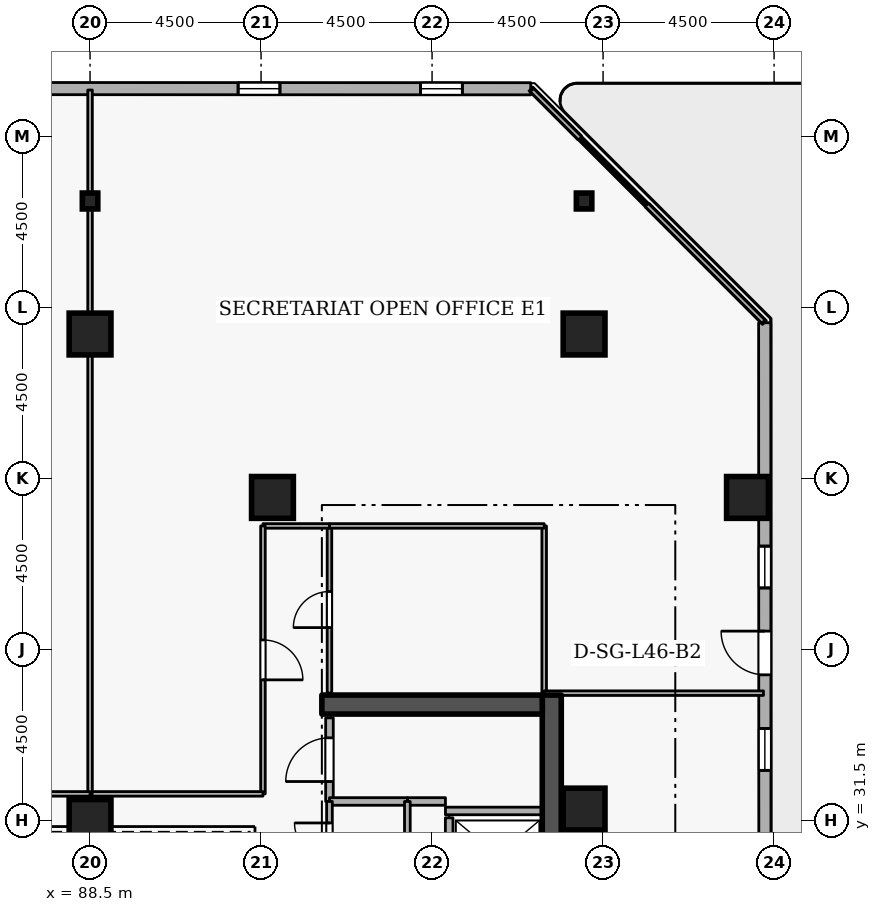
"""IFC4 building model, lengths in metres.
Left out: names, types, materials, properties, quantities, classifications, styles, units other than length and angle.
Written with IfcOpenShell. Run it as: python <this file> out.ifc"""

import sys

from ifc_helpers import new_model, si_unit, direction, frame, frame_2d, origin, origin_2d, place, context, subcontext, project, spatial, rectangle, i_section, extrude, element, fill, save


model = new_model("IFC4")
c1 = context("Model", 3, precision=1e-05, world=origin(), true_north=direction((0.0, 1.0)))
c2 = subcontext(c1, "Body", "Model", "MODEL_VIEW")
j1 = project(units=[si_unit("LENGTHUNIT", "METRE"), si_unit("PLANEANGLEUNIT", "RADIAN")], contexts=[c1])
p1 = place(None, origin())
s1 = spatial("IfcSite", under=j1, at=p1, CompositionType="ELEMENT")
p2 = place(p1, origin())
s2 = spatial("IfcBuilding", under=s1, at=p2, CompositionType="ELEMENT")
p3 = place(p2, frame((0.0, 0.0, 174.3)))
s3 = spatial("IfcBuildingStorey", under=s2, at=p3, CompositionType="ELEMENT", Elevation=174.3)
p4 = place(p3, frame((100.65, 19.2, 0.0), z_axis=(0.0, 0.0, 1.0), x_axis=(0.0, 1.0, 0.0)))
e1 = element("IfcWall", 1, at=p4, inside=s3, PredefinedType="SHEAR", context=c2, shape_type="SweptSolid", body=[
    extrude(rectangle(XDim=15.6, YDim=0.5, at=frame_2d((7.8, 0.0))), origin(), (0.0, 0.0, 1.0), 4.2),
])
p5 = place(p3, frame((94.6, 34.55, 0.0), z_axis=(0.0, 0.0, 1.0), x_axis=(1.0, 0.0, 0.0)))
e2 = element("IfcWall", 2, at=p5, inside=s3, PredefinedType="SHEAR", context=c2, shape_type="SweptSolid", body=[
    extrude(rectangle(XDim=5.8, YDim=0.5, at=frame_2d((2.9, 0.0))), origin(), (0.0, 0.0, 1.0), 4.2),
])
for number, where, z_axis, x_axis in (
    (3, (105.8, 40.0, 0.0), (0.0, 0.0, 1.0), (1.0, 0.0, 0.0)),
    (4, (101.5, 44.3, 0.0), (0.0, 0.0, 1.0), (1.0, 0.0, 0.0)),
    (5, (88.5, 44.3, 0.0), (0.0, 0.0, 1.0), (1.0, 0.0, 0.0)),
    (6, (93.3, 40.0, 0.0), (0.0, 0.0, 1.0), (1.0, 0.0, 0.0)),
    (7, (101.5, 31.8, 0.0), (0.0, 0.0, 1.0), (1.0, 0.0, 0.0)),
    (8, (88.5, 31.5, 0.0), (0.0, 0.0, 1.0), (1.0, 0.0, 0.0)),
):
    element("IfcColumn", number, at=place(p3, frame(where, z_axis=z_axis, x_axis=x_axis)), inside=s3, PredefinedType="COLUMN", context=c2, shape_type="SweptSolid", body=[
        extrude(rectangle(XDim=1.1, YDim=1.1, at=origin_2d()), origin(), (0.0, 0.0, 1.0), 4.2),
    ])
for number, where, z_axis, x_axis in (
    (9, (101.5, 47.8, 0.0), (0.0, 0.0, 1.0), (1.0, 0.0, 0.0)),
    (10, (88.5, 47.8, 0.0), (0.0, 0.0, 1.0), (1.0, 0.0, 0.0)),
):
    element("IfcColumn", number, at=place(p3, frame(where, z_axis=z_axis, x_axis=x_axis)), inside=s3, PredefinedType="COLUMN", context=c2, shape_type="SweptSolid", body=[
        extrude(i_section(OverallWidth=0.407, OverallDepth=0.419, WebThickness=0.031, FlangeThickness=0.049, FilletRadius=0.015, at=origin_2d()), origin(), (0.0, 0.0, 1.0), 4.2),
    ])
p6 = place(p3, frame((106.265, 11.819, 0.0), z_axis=(0.0, 0.0, 1.0), x_axis=(-0.000364968916, 0.999999933399, 0.0)))
e11 = element("IfcWall", 11, at=p6, inside=s3, PredefinedType="STANDARD", context=c2, shape_type="SweptSolid", body=[
    extrude(rectangle(XDim=32.778, YDim=0.32, at=frame_2d((16.389, 0.0))), origin(), (0.0, 0.0, 1.0), 3.3),
])
p7 = place(p6, frame((23.514, 0.0, 0.0)))
e12 = element("IfcOpeningElement", 12, at=p7, cuts=e11, PredefinedType="OPENING", context=c2, shape_type="SweptSolid", body=[
    extrude(rectangle(XDim=1.15, YDim=2.1, at=frame_2d((0.575, 1.05))), frame((0.0, 0.17, 0.0), z_axis=(0.0, -1.0, 0.0), x_axis=(1.0, 0.0, 0.0)), (0.0, 0.0, 1.0), 0.34),
])
p8 = place(p6, frame((6.6, 0.0, 0.72)))
e13 = element("IfcOpeningElement", 13, at=p8, cuts=e11, PredefinedType="OPENING", context=c2, shape_type="SweptSolid", body=[
    extrude(rectangle(XDim=1.1, YDim=1.8, at=frame_2d((0.55, 0.9))), frame((0.0, 0.17, 0.0), z_axis=(0.0, -1.0, 0.0), x_axis=(1.0, 0.0, 0.0)), (0.0, 0.0, 1.0), 0.34),
])
p9 = place(p6, frame((11.4, 0.0, 0.72)))
e14 = element("IfcOpeningElement", 14, at=p9, cuts=e11, PredefinedType="OPENING", context=c2, shape_type="SweptSolid", body=[
    extrude(rectangle(XDim=1.1, YDim=1.8, at=frame_2d((0.55, 0.9))), frame((0.0, 0.17, 0.0), z_axis=(0.0, -1.0, 0.0), x_axis=(1.0, 0.0, 0.0)), (0.0, 0.0, 1.0), 0.34),
])
p10 = place(p6, frame((21.0, 0.0, 0.72)))
e15 = element("IfcOpeningElement", 15, at=p10, cuts=e11, PredefinedType="OPENING", context=c2, shape_type="SweptSolid", body=[
    extrude(rectangle(XDim=1.1, YDim=1.8, at=frame_2d((0.55, 0.9))), frame((0.0, 0.17, 0.0), z_axis=(0.0, -1.0, 0.0), x_axis=(1.0, 0.0, 0.0)), (0.0, 0.0, 1.0), 0.34),
])
p11 = place(p6, frame((25.8, 0.0, 0.72)))
e16 = element("IfcOpeningElement", 16, at=p11, cuts=e11, PredefinedType="OPENING", context=c2, shape_type="SweptSolid", body=[
    extrude(rectangle(XDim=1.1, YDim=1.8, at=frame_2d((0.55, 0.9))), frame((0.0, 0.17, 0.0), z_axis=(0.0, -1.0, 0.0), x_axis=(1.0, 0.0, 0.0)), (0.0, 0.0, 1.0), 0.34),
])
p12 = place(p3, frame((100.096, 50.753, 0.0), z_axis=(0.0, 0.0, 1.0), x_axis=(-0.999999933399, 0.000364968916, 0.0)))
e17 = element("IfcWall", 17, at=p12, inside=s3, PredefinedType="STANDARD", context=c2, shape_type="SweptSolid", body=[
    extrude(rectangle(XDim=32.778, YDim=0.32, at=frame_2d((16.389, 0.0))), origin(), (0.0, 0.0, 1.0), 3.3),
])
p13 = place(p12, frame((1.8, 0.0, 0.72)))
e18 = element("IfcOpeningElement", 18, at=p13, cuts=e17, PredefinedType="OPENING", context=c2, shape_type="SweptSolid", body=[
    extrude(rectangle(XDim=1.1, YDim=1.8, at=frame_2d((0.55, 0.9))), frame((0.0, 0.17, 0.0), z_axis=(0.0, -1.0, 0.0), x_axis=(1.0, 0.0, 0.0)), (0.0, 0.0, 1.0), 0.34),
])
p14 = place(p12, frame((6.6, 0.0, 0.72)))
e19 = element("IfcOpeningElement", 19, at=p14, cuts=e17, PredefinedType="OPENING", context=c2, shape_type="SweptSolid", body=[
    extrude(rectangle(XDim=1.1, YDim=1.8, at=frame_2d((0.55, 0.9))), frame((0.0, 0.17, 0.0), z_axis=(0.0, -1.0, 0.0), x_axis=(1.0, 0.0, 0.0)), (0.0, 0.0, 1.0), 0.34),
])
p15 = place(p12, frame((16.2, 0.0, 0.72)))
e20 = element("IfcOpeningElement", 20, at=p15, cuts=e17, PredefinedType="OPENING", context=c2, shape_type="SweptSolid", body=[
    extrude(rectangle(XDim=1.1, YDim=1.8, at=frame_2d((0.55, 0.9))), frame((0.0, 0.17, 0.0), z_axis=(0.0, -1.0, 0.0), x_axis=(1.0, 0.0, 0.0)), (0.0, 0.0, 1.0), 0.34),
])
p16 = place(p12, frame((21.0, 0.0, 0.72)))
e21 = element("IfcOpeningElement", 21, at=p16, cuts=e17, PredefinedType="OPENING", context=c2, shape_type="SweptSolid", body=[
    extrude(rectangle(XDim=1.1, YDim=1.8, at=frame_2d((0.55, 0.9))), frame((0.0, 0.17, 0.0), z_axis=(0.0, -1.0, 0.0), x_axis=(1.0, 0.0, 0.0)), (0.0, 0.0, 1.0), 0.34),
])
p17 = place(p12, frame((25.8, 0.0, 0.72)))
e22 = element("IfcOpeningElement", 22, at=p17, cuts=e17, PredefinedType="OPENING", context=c2, shape_type="SweptSolid", body=[
    extrude(rectangle(XDim=1.1, YDim=1.8, at=frame_2d((0.55, 0.9))), frame((0.0, 0.17, 0.0), z_axis=(0.0, -1.0, 0.0), x_axis=(1.0, 0.0, 0.0)), (0.0, 0.0, 1.0), 0.34),
])
p18 = place(p3, frame((97.95, 31.57, 0.0), z_axis=(0.0, 0.0, 1.0), x_axis=(0.0, -1.0, 0.0)))
e23 = element("IfcWall", 23, at=p18, inside=s3, PredefinedType="STANDARD", context=c2, shape_type="SweptSolid", body=[
    extrude(rectangle(XDim=1.99, YDim=0.2, at=frame_2d((0.995, 0.0))), origin(), (0.0, 0.0, 1.0), 3.94),
])
p19 = place(p18, frame((0.485, 0.0, 0.0)))
e24 = element("IfcOpeningElement", 24, at=p19, cuts=e23, PredefinedType="OPENING", context=c2, shape_type="SweptSolid", body=[
    extrude(rectangle(XDim=1.02, YDim=2.06, at=frame_2d((0.51, 1.03))), frame((0.0, 0.11, 0.0), z_axis=(0.0, -1.0, 0.0), x_axis=(1.0, 0.0, 0.0)), (0.0, 0.0, 1.0), 0.22),
])
p20 = place(p3, frame((97.852, 31.75, 0.0), z_axis=(0.0, 0.0, 1.0), x_axis=(1.0, 0.0, 0.0)))
e25 = element("IfcWall", 25, at=p20, inside=s3, PredefinedType="STANDARD", context=c2, shape_type="SweptSolid", body=[
    extrude(rectangle(XDim=2.536, YDim=0.2, at=frame_2d((1.268, 0.0))), origin(), (0.0, 0.0, 1.0), 3.94),
])
p21 = place(p3, frame((94.8, 32.0, 0.0), z_axis=(0.0, 0.0, 1.0), x_axis=(0.0, 1.0, 0.0)))
e26 = element("IfcWall", 26, at=p21, inside=s3, PredefinedType="STANDARD", context=c2, shape_type="SweptSolid", body=[
    extrude(rectangle(XDim=2.2, YDim=0.2, at=frame_2d((1.1, 0.0))), origin(), (0.0, 0.0, 1.0), 3.94),
])
p22 = place(p21, frame((0.525, 0.0, 0.0)))
e27 = element("IfcOpeningElement", 27, at=p22, cuts=e26, PredefinedType="OPENING", context=c2, shape_type="SweptSolid", body=[
    extrude(rectangle(XDim=1.15, YDim=2.1, at=frame_2d((0.575, 1.05))), frame((0.0, 0.11, 0.0), z_axis=(0.0, -1.0, 0.0), x_axis=(1.0, 0.0, 0.0)), (0.0, 0.0, 1.0), 0.22),
])
p23 = place(p3, frame((97.852, 32.0, 0.0), z_axis=(0.0, 0.0, 1.0), x_axis=(-1.0, 0.0, 0.0)))
e28 = element("IfcWall", 28, at=p23, inside=s3, PredefinedType="STANDARD", context=c2, shape_type="SweptSolid", body=[
    extrude(rectangle(XDim=1.002, YDim=0.2, at=frame_2d((0.501, 0.0))), origin(), (0.0, 0.0, 1.0), 3.94),
])
p24 = place(p3, frame((96.85, 32.0, 0.0), z_axis=(0.0, 0.0, 1.0), x_axis=(-1.0, 0.0, 0.0)))
e29 = element("IfcWall", 29, at=p24, inside=s3, PredefinedType="STANDARD", context=c2, shape_type="SweptSolid", body=[
    extrude(rectangle(XDim=2.05, YDim=0.2, at=frame_2d((1.025, 0.0))), origin(), (0.0, 0.0, 1.0), 3.94),
])
p25 = place(p3, frame((94.8, 29.95, 0.0), z_axis=(0.0, 0.0, 1.0), x_axis=(0.0, 1.0, 0.0)))
e30 = element("IfcWall", 30, at=p25, inside=s3, PredefinedType="PARTITIONING", context=c2, shape_type="SweptSolid", body=[
    extrude(rectangle(XDim=2.05, YDim=0.15, at=frame_2d((1.025, 0.0))), origin(), (0.0, 0.0, 1.0), 3.94),
])
p26 = place(p25, frame((0.565, 0.0, 0.0)))
e31 = element("IfcOpeningElement", 31, at=p26, cuts=e30, PredefinedType="OPENING", context=c2, shape_type="SweptSolid", body=[
    extrude(rectangle(XDim=0.92, YDim=2.08, at=frame_2d((0.46, 1.04))), frame((0.0, 0.085, 0.0), z_axis=(0.0, -1.0, 0.0), x_axis=(1.0, 0.0, 0.0)), (0.0, 0.0, 1.0), 0.17),
])
p27 = place(p3, frame((96.85, 32.0, 0.0), z_axis=(0.0, 0.0, 1.0), x_axis=(0.0, -1.0, 0.0)))
e32 = element("IfcWall", 32, at=p27, inside=s3, PredefinedType="PARTITIONING", context=c2, shape_type="SweptSolid", body=[
    extrude(rectangle(XDim=2.05, YDim=0.15, at=frame_2d((1.025, 0.0))), origin(), (0.0, 0.0, 1.0), 3.94),
])
p28 = place(p3, frame((100.45, 39.25, 0.0), z_axis=(0.0, 0.0, 1.0), x_axis=(0.0, -1.0, 0.0)))
e33 = element("IfcWall", 33, at=p28, inside=s3, PredefinedType="PARTITIONING", context=c2, shape_type="SweptSolid", body=[
    extrude(rectangle(XDim=4.4, YDim=0.12, at=frame_2d((2.2, 0.0))), origin(), (0.0, 0.0, 1.0), 3.94),
])
p29 = place(p3, frame((94.8, 34.85, 0.0), z_axis=(0.0, 0.0, 1.0), x_axis=(0.0, 1.0, 0.0)))
e34 = element("IfcWall", 34, at=p29, inside=s3, PredefinedType="PARTITIONING", context=c2, shape_type="SweptSolid", body=[
    extrude(rectangle(XDim=4.4, YDim=0.12, at=frame_2d((2.2, 0.0))), origin(), (0.0, 0.0, 1.0), 3.94),
])
p30 = place(p29, frame((1.725, 0.0, 0.0)))
e35 = element("IfcOpeningElement", 35, at=p30, cuts=e34, PredefinedType="OPENING", context=c2, shape_type="SweptSolid", body=[
    extrude(rectangle(XDim=0.95, YDim=2.1, at=frame_2d((0.475, 1.05))), frame((0.0, 0.07, 0.0), z_axis=(0.0, -1.0, 0.0), x_axis=(1.0, 0.0, 0.0)), (0.0, 0.0, 1.0), 0.14),
])
p31 = place(p3, frame((94.8, 39.25, 0.0), z_axis=(0.0, 0.0, 1.0), x_axis=(1.0, 0.0, 0.0)))
e36 = element("IfcWall", 36, at=p31, inside=s3, PredefinedType="PARTITIONING", context=c2, shape_type="SweptSolid", body=[
    extrude(rectangle(XDim=5.65, YDim=0.12, at=frame_2d((2.825, 0.0))), origin(), (0.0, 0.0, 1.0), 3.94),
])
p32 = place(p3, frame((94.8, 39.25, 0.0), z_axis=(0.0, 0.0, 1.0), x_axis=(-1.0, 0.0, 0.0)))
e37 = element("IfcWall", 37, at=p32, inside=s3, PredefinedType="PARTITIONING", context=c2, shape_type="SweptSolid", body=[
    extrude(rectangle(XDim=1.75, YDim=0.12, at=frame_2d((0.875, 0.0))), origin(), (0.0, 0.0, 1.0), 3.94),
])
p33 = place(p3, frame((93.05, 39.25, 0.0), z_axis=(0.0, 0.0, 1.0), x_axis=(0.0, -1.0, 0.0)))
e38 = element("IfcWall", 38, at=p33, inside=s3, PredefinedType="PARTITIONING", context=c2, shape_type="SweptSolid", body=[
    extrude(rectangle(XDim=7.05, YDim=0.12, at=frame_2d((3.525, 0.0))), origin(), (0.0, 0.0, 1.0), 3.94),
])
p34 = place(p33, frame((3.0, 0.0, 0.0)))
e39 = element("IfcOpeningElement", 39, at=p34, cuts=e38, PredefinedType="OPENING", context=c2, shape_type="SweptSolid", body=[
    extrude(rectangle(XDim=1.05, YDim=2.1, at=frame_2d((0.525, 1.05))), frame((0.0, 0.07, 0.0), z_axis=(0.0, -1.0, 0.0), x_axis=(1.0, 0.0, 0.0)), (0.0, 0.0, 1.0), 0.14),
])
p35 = place(p3, frame((93.05, 32.2, 0.0), z_axis=(0.0, 0.0, 1.0), x_axis=(-1.0, 0.0, 0.0)))
e40 = element("IfcWall", 40, at=p35, inside=s3, PredefinedType="PARTITIONING", context=c2, shape_type="SweptSolid", body=[
    extrude(rectangle(XDim=4.55, YDim=0.12, at=frame_2d((2.275, 0.0))), origin(), (0.0, 0.0, 1.0), 3.94),
])
p36 = place(p3, frame((88.5, 32.2, 0.0), z_axis=(0.0, 0.0, 1.0), x_axis=(0.0, 1.0, 0.0)))
e41 = element("IfcWall", 41, at=p36, inside=s3, PredefinedType="PARTITIONING", context=c2, shape_type="SweptSolid", body=[
    extrude(rectangle(XDim=18.52, YDim=0.12, at=frame_2d((9.26, 0.0))), origin(), (0.0, 0.0, 1.0), 3.532),
])
p37 = place(p3, frame((100.125, 50.72, 0.0), z_axis=(0.0, 0.0, 1.0), x_axis=(0.707106781187, -0.707106781187, 0.0)))
e42 = element("IfcWall", 42, at=p37, inside=s3, PredefinedType="PARTITIONING", context=c2, shape_type="SweptSolid", body=[
    extrude(rectangle(XDim=8.619, YDim=0.12, at=frame_2d((4.31, 0.0))), origin(), (0.0, 0.0, 1.0), 3.94),
])
p38 = place(p3, frame((106.22, 34.85, 0.0), z_axis=(0.0, 0.0, 1.0), x_axis=(-1.0, 0.0, 0.0)))
e43 = element("IfcWall", 43, at=p38, inside=s3, PredefinedType="PARTITIONING", context=c2, shape_type="SweptSolid", body=[
    extrude(rectangle(XDim=5.77, YDim=0.12, at=frame_2d((2.885, 0.0))), origin(), (0.0, 0.0, 1.0), 3.145),
])
p39 = place(p3, frame((88.5, 32.2, 0.0), z_axis=(0.0, 0.0, 1.0), x_axis=(-1.0, 0.0, 0.0)))
e44 = element("IfcWall", 44, at=p39, inside=s3, PredefinedType="PARTITIONING", context=c2, shape_type="SweptSolid", body=[
    extrude(rectangle(XDim=4.55, YDim=0.12, at=frame_2d((2.275, 0.0))), origin(), (0.0, 0.0, 1.0), 3.94),
])
p40 = place(p7, origin())
e45 = element("IfcDoor", 45, at=p40, inside=s3, OperationType="SINGLE_SWING_RIGHT", PredefinedType="DOOR", context=c2, shape_type="SweptSolid", body=[
    extrude(rectangle(XDim=1.15, YDim=2.1, at=frame_2d((0.575, 1.05))), frame((0.0, 0.025, 0.0), z_axis=(0.0, -1.0, 0.0), x_axis=(1.0, 0.0, 0.0)), (0.0, 0.0, 1.0), 0.05),
])
fill(e12, e45)
p41 = place(p10, origin())
e46 = element("IfcWindow", 46, at=p41, inside=s3, PartitioningType="SINGLE_PANEL", PredefinedType="WINDOW", context=c2, shape_type="SweptSolid", body=[
    extrude(rectangle(XDim=1.1, YDim=1.8, at=frame_2d((0.55, 0.9))), frame((0.0, 0.03, 0.0), z_axis=(0.0, -1.0, 0.0), x_axis=(1.0, 0.0, 0.0)), (0.0, 0.0, 1.0), 0.06),
])
fill(e15, e46)
p42 = place(p11, origin())
e47 = element("IfcWindow", 47, at=p42, inside=s3, PartitioningType="SINGLE_PANEL", PredefinedType="WINDOW", context=c2, shape_type="SweptSolid", body=[
    extrude(rectangle(XDim=1.1, YDim=1.8, at=frame_2d((0.55, 0.9))), frame((0.0, 0.03, 0.0), z_axis=(0.0, -1.0, 0.0), x_axis=(1.0, 0.0, 0.0)), (0.0, 0.0, 1.0), 0.06),
])
fill(e16, e47)
p43 = place(p13, origin())
e48 = element("IfcWindow", 48, at=p43, inside=s3, PartitioningType="SINGLE_PANEL", PredefinedType="WINDOW", context=c2, shape_type="SweptSolid", body=[
    extrude(rectangle(XDim=1.1, YDim=1.8, at=frame_2d((0.55, 0.9))), frame((0.0, 0.03, 0.0), z_axis=(0.0, -1.0, 0.0), x_axis=(1.0, 0.0, 0.0)), (0.0, 0.0, 1.0), 0.06),
])
fill(e18, e48)
p44 = place(p14, origin())
e49 = element("IfcWindow", 49, at=p44, inside=s3, PartitioningType="SINGLE_PANEL", PredefinedType="WINDOW", context=c2, shape_type="SweptSolid", body=[
    extrude(rectangle(XDim=1.1, YDim=1.8, at=frame_2d((0.55, 0.9))), frame((0.0, 0.03, 0.0), z_axis=(0.0, -1.0, 0.0), x_axis=(1.0, 0.0, 0.0)), (0.0, 0.0, 1.0), 0.06),
])
fill(e19, e49)
p45 = place(p26, origin())
e50 = element("IfcDoor", 50, at=p45, inside=s3, OperationType="SINGLE_SWING_RIGHT", PredefinedType="DOOR", context=c2, shape_type="SweptSolid", body=[
    extrude(rectangle(XDim=0.92, YDim=2.08, at=frame_2d((0.46, 1.04))), frame((0.0, 0.025, 0.0), z_axis=(0.0, -1.0, 0.0), x_axis=(1.0, 0.0, 0.0)), (0.0, 0.0, 1.0), 0.05),
])
fill(e31, e50)
p46 = place(p22, origin())
e51 = element("IfcDoor", 51, at=p46, inside=s3, OperationType="SINGLE_SWING_LEFT", PredefinedType="DOOR", context=c2, shape_type="SweptSolid", body=[
    extrude(rectangle(XDim=1.15, YDim=2.1, at=frame_2d((0.575, 1.05))), frame((0.0, 0.025, 0.0), z_axis=(0.0, -1.0, 0.0), x_axis=(1.0, 0.0, 0.0)), (0.0, 0.0, 1.0), 0.05),
])
fill(e27, e51)
p47 = place(p30, origin())
e52 = element("IfcDoor", 52, at=p47, inside=s3, OperationType="SINGLE_SWING_LEFT", PredefinedType="DOOR", context=c2, shape_type="SweptSolid", body=[
    extrude(rectangle(XDim=0.95, YDim=2.1, at=frame_2d((0.475, 1.05))), frame((0.0, 0.025, 0.0), z_axis=(0.0, -1.0, 0.0), x_axis=(1.0, 0.0, 0.0)), (0.0, 0.0, 1.0), 0.05),
])
fill(e35, e52)
p48 = place(p34, origin())
e53 = element("IfcDoor", 53, at=p48, inside=s3, OperationType="SINGLE_SWING_RIGHT", PredefinedType="DOOR", context=c2, shape_type="SweptSolid", body=[
    extrude(rectangle(XDim=1.05, YDim=2.1, at=frame_2d((0.525, 1.05))), frame((0.0, 0.025, 0.0), z_axis=(0.0, -1.0, 0.0), x_axis=(1.0, 0.0, 0.0)), (0.0, 0.0, 1.0), 0.05),
])
fill(e39, e53)
save(model, sys.argv[1])
